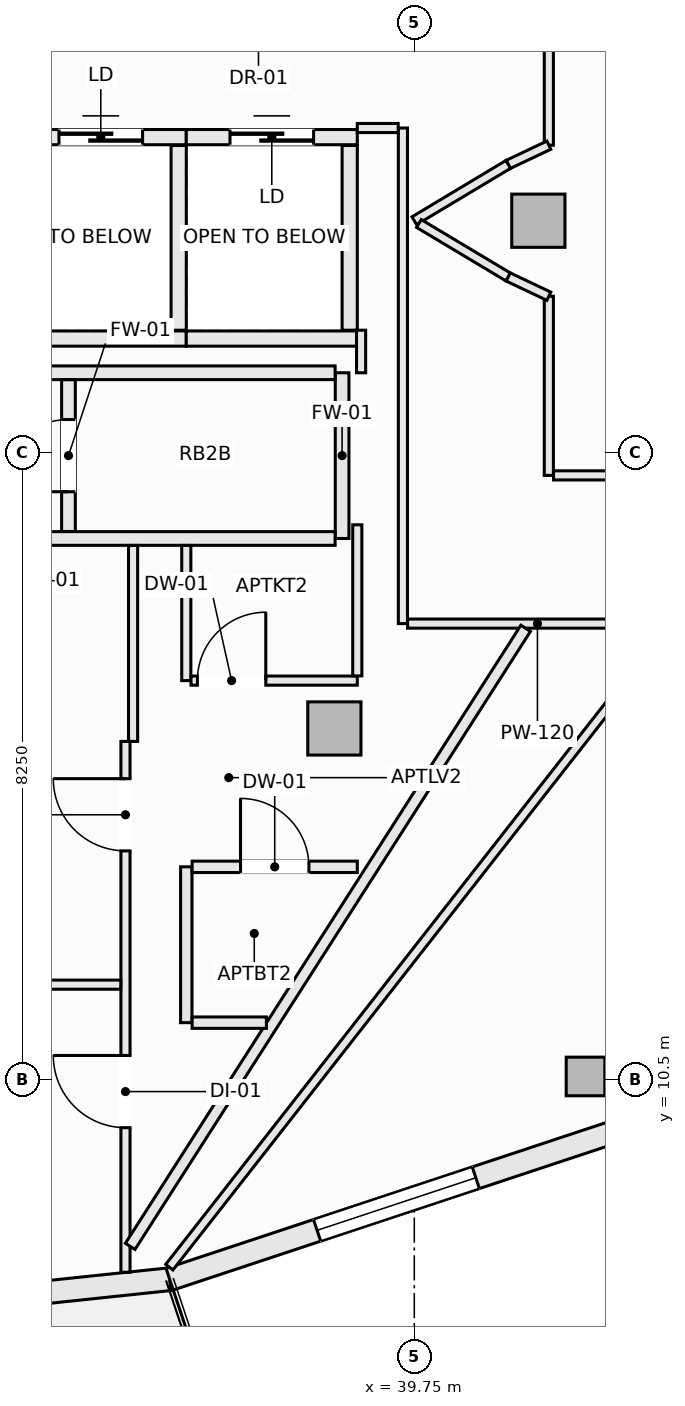
"""IFC4 building model, lengths in metres.
Left out: names, types, materials, properties, quantities, classifications, styles, units other than length and angle.
Written with IfcOpenShell. Run it as: python <this file> out.ifc"""

import sys

from ifc_helpers import new_model, si_unit, direction, frame, frame_2d, origin, origin_2d, place, context, subcontext, project, spatial, rectangle, hollow_rectangle, extrude, element, fill, save


model = new_model("IFC4")
c1 = context("Model", 3, precision=1e-05, world=origin(), true_north=direction((0.0, 1.0)))
c2 = subcontext(c1, "Body", "Model", "MODEL_VIEW")
j1 = project(units=[si_unit("LENGTHUNIT", "METRE"), si_unit("PLANEANGLEUNIT", "RADIAN")], contexts=[c1])
p1 = place(None, origin())
s1 = spatial("IfcSite", under=j1, at=p1, CompositionType="ELEMENT")
p2 = place(p1, origin())
s2 = spatial("IfcBuilding", under=s1, at=p2, CompositionType="ELEMENT")
p3 = place(p2, frame((0.0, 0.0, 212.9)))
s3 = spatial("IfcBuildingStorey", under=s2, at=p3, CompositionType="ELEMENT", Elevation=212.9)
p4 = place(p3, frame((42.003, 10.542, -0.27), z_axis=(0.0, 0.0, 1.0), x_axis=(1.0, 0.0, 0.0)))
e1 = element("IfcColumn", 1, at=p4, inside=s3, PredefinedType="COLUMN", context=c2, shape_type="SweptSolid", body=[
    extrude(hollow_rectangle(XDim=0.508, YDim=0.508, WallThickness=0.019, at=origin_2d()), origin(), (0.0, 0.0, 1.0), 3.3),
])
for number, where, z_axis, x_axis in (
    (2, (38.698, 15.121, -0.27), (0.0, 0.0, 1.0), (1.0, 0.0, 0.0)),
    (3, (41.382, 21.801, -0.27), (0.0, 0.0, 1.0), (1.0, 0.0, 0.0)),
):
    element("IfcColumn", number, at=place(p3, frame(where, z_axis=z_axis, x_axis=x_axis)), inside=s3, PredefinedType="COLUMN", context=c2, shape_type="SweptSolid", body=[
        extrude(rectangle(XDim=0.7, YDim=0.7, at=origin_2d()), origin(), (0.0, 0.0, 1.0), 3.3),
    ])
p5 = place(p3, frame((30.125, 7.2, 0.0), z_axis=(0.0, 0.0, 1.0), x_axis=(0.994497142298, 0.104763705363, 0.0)))
e4 = element("IfcWall", 4, at=p5, inside=s3, PredefinedType="SOLIDWALL", context=c2, shape_type="SweptSolid", body=[
    extrude(rectangle(XDim=6.441, YDim=0.3, at=frame_2d((3.221, 0.0))), origin(), (0.0, 0.0, 1.0), 2.605),
])
p6 = place(p5, frame((2.45, 0.0, 0.72)))
e5 = element("IfcOpeningElement", 5, at=p6, cuts=e4, PredefinedType="OPENING", context=c2, shape_type="SweptSolid", body=[
    extrude(rectangle(XDim=2.2, YDim=1.65, at=frame_2d((1.1, 0.825))), frame((0.0, 0.16, 0.0), z_axis=(0.0, -1.0, 0.0), x_axis=(1.0, 0.0, 0.0)), (0.0, 0.0, 1.0), 0.32),
])
p7 = place(p3, frame((36.531, 7.875, 0.0), z_axis=(0.0, 0.0, 1.0), x_axis=(0.949240877604, 0.314550085495, 0.0)))
e6 = element("IfcWall", 6, at=p7, inside=s3, PredefinedType="SOLIDWALL", context=c2, shape_type="SweptSolid", body=[
    extrude(rectangle(XDim=6.288, YDim=0.3, at=frame_2d((3.144, 0.0))), origin(), (0.0, 0.0, 1.0), 2.605),
])
p8 = place(p7, frame((2.044, 0.0, 0.72)))
e7 = element("IfcOpeningElement", 7, at=p8, cuts=e6, PredefinedType="OPENING", context=c2, shape_type="SweptSolid", body=[
    extrude(rectangle(XDim=2.2, YDim=1.65, at=frame_2d((1.1, 0.825))), frame((0.0, 0.16, 0.0), z_axis=(0.0, -1.0, 0.0), x_axis=(1.0, 0.0, 0.0)), (0.0, 0.0, 1.0), 0.32),
])
p9 = place(p3, frame((34.5, 22.9, 0.0), z_axis=(0.0, 0.0, 1.0), x_axis=(1.0, 0.0, 0.0)))
e8 = element("IfcWall", 8, at=p9, inside=s3, PredefinedType="SOLIDWALL", context=c2, shape_type="SweptSolid", body=[
    extrude(rectangle(XDim=2.25, YDim=0.2, at=frame_2d((1.125, 0.0))), origin(), (0.0, 0.0, 1.0), 3.03),
])
p10 = place(p9, frame((0.575, 0.0, 0.0)))
e9 = element("IfcOpeningElement", 9, at=p10, cuts=e8, PredefinedType="OPENING", context=c2, shape_type="SweptSolid", body=[
    extrude(rectangle(XDim=1.1, YDim=2.2, at=frame_2d((0.55, 1.1))), frame((0.0, 0.11, 0.0), z_axis=(0.0, -1.0, 0.0), x_axis=(1.0, 0.0, 0.0)), (0.0, 0.0, 1.0), 0.22),
])
p11 = place(p3, frame((34.5, 20.25, 0.0), z_axis=(0.0, 0.0, 1.0), x_axis=(1.0, 0.0, 0.0)))
e10 = element("IfcWall", 10, at=p11, inside=s3, PredefinedType="SOLIDWALL", context=c2, shape_type="SweptSolid", body=[
    extrude(rectangle(XDim=2.25, YDim=0.2, at=frame_2d((1.125, 0.0))), origin(), (0.0, 0.0, 1.0), 3.03),
])
p12 = place(p3, frame((36.65, 20.36, 0.0), z_axis=(0.0, 0.0, 1.0), x_axis=(0.0, 1.0, 0.0)))
e11 = element("IfcWall", 11, at=p12, inside=s3, PredefinedType="SOLIDWALL", context=c2, shape_type="SweptSolid", body=[
    extrude(rectangle(XDim=2.43, YDim=0.2, at=frame_2d((1.215, 0.0))), origin(), (0.0, 0.0, 1.0), 3.03),
])
p13 = place(p3, frame((36.75, 22.9, 0.0), z_axis=(0.0, 0.0, 1.0), x_axis=(1.0, 0.0, 0.0)))
e12 = element("IfcWall", 12, at=p13, inside=s3, PredefinedType="SOLIDWALL", context=c2, shape_type="SweptSolid", body=[
    extrude(rectangle(XDim=2.25, YDim=0.2, at=frame_2d((1.125, 0.0))), origin(), (0.0, 0.0, 1.0), 3.03),
])
p14 = place(p13, frame((0.575, 0.0, 0.0)))
e13 = element("IfcOpeningElement", 13, at=p14, cuts=e12, PredefinedType="OPENING", context=c2, shape_type="SweptSolid", body=[
    extrude(rectangle(XDim=1.1, YDim=2.2, at=frame_2d((0.55, 1.1))), frame((0.0, 0.11, 0.0), z_axis=(0.0, -1.0, 0.0), x_axis=(1.0, 0.0, 0.0)), (0.0, 0.0, 1.0), 0.22),
])
p15 = place(p3, frame((36.75, 20.25, 0.0), z_axis=(0.0, 0.0, 1.0), x_axis=(1.0, 0.0, 0.0)))
e14 = element("IfcWall", 14, at=p15, inside=s3, PredefinedType="SOLIDWALL", context=c2, shape_type="SweptSolid", body=[
    extrude(rectangle(XDim=2.25, YDim=0.2, at=frame_2d((1.125, 0.0))), origin(), (0.0, 0.0, 1.0), 3.03),
])
p16 = place(p3, frame((38.9, 20.36, 0.0), z_axis=(0.0, 0.0, 1.0), x_axis=(0.0, 1.0, 0.0)))
e15 = element("IfcWall", 15, at=p16, inside=s3, PredefinedType="SOLIDWALL", context=c2, shape_type="SweptSolid", body=[
    extrude(rectangle(XDim=2.43, YDim=0.2, at=frame_2d((1.215, 0.0))), origin(), (0.0, 0.0, 1.0), 3.03),
])
p17 = place(p3, frame((38.8, 17.62, 0.0), z_axis=(0.0, 0.0, 1.0), x_axis=(0.0, 1.0, 0.0)))
e16 = element("IfcWall", 16, at=p17, inside=s3, PredefinedType="SOLIDWALL", context=c2, shape_type="SweptSolid", body=[
    extrude(rectangle(XDim=2.18, YDim=0.18, at=frame_2d((1.09, 0.0))), origin(), (0.0, 0.0, 1.0), 3.03),
])
p18 = place(p3, frame((30.062, 17.62, 0.0), z_axis=(0.0, 0.0, 1.0), x_axis=(1.0, 0.0, 0.0)))
e17 = element("IfcWall", 17, at=p18, inside=s3, PredefinedType="SOLIDWALL", context=c2, shape_type="SweptSolid", body=[
    extrude(rectangle(XDim=8.646, YDim=0.18, at=frame_2d((4.323, 0.0))), origin(), (0.0, 0.0, 1.0), 3.03),
])
p19 = place(p18, frame((2.299, 0.0, 0.0)))
e18 = element("IfcOpeningElement", 18, at=p19, cuts=e17, PredefinedType="OPENING", context=c2, shape_type="SweptSolid", body=[
    extrude(rectangle(XDim=0.95, YDim=2.1, at=frame_2d((0.475, 1.05))), frame((0.0, 0.1, 0.0), z_axis=(0.0, -1.0, 0.0), x_axis=(1.0, 0.0, 0.0)), (0.0, 0.0, 1.0), 0.2),
])
p20 = place(p3, frame((30.062, 19.8, 0.0), z_axis=(0.0, 0.0, 1.0), x_axis=(1.0, 0.0, 0.0)))
e19 = element("IfcWall", 19, at=p20, inside=s3, PredefinedType="SOLIDWALL", context=c2, shape_type="SweptSolid", body=[
    extrude(rectangle(XDim=8.646, YDim=0.18, at=frame_2d((4.323, 0.0))), origin(), (0.0, 0.0, 1.0), 3.03),
])
p21 = place(p3, frame((35.2, 17.712, 0.0), z_axis=(0.0, 0.0, 1.0), x_axis=(0.0, 1.0, 0.0)))
e20 = element("IfcWall", 20, at=p21, inside=s3, PredefinedType="SOLIDWALL", context=c2, shape_type="SweptSolid", body=[
    extrude(rectangle(XDim=1.996, YDim=0.18, at=frame_2d((0.998, 0.0))), origin(), (0.0, 0.0, 1.0), 3.03),
])
p22 = place(p21, frame((0.523, 0.0, 0.0)))
e21 = element("IfcOpeningElement", 21, at=p22, cuts=e20, PredefinedType="OPENING", context=c2, shape_type="SweptSolid", body=[
    extrude(rectangle(XDim=0.95, YDim=2.1, at=frame_2d((0.475, 1.05))), frame((0.0, 0.1, 0.0), z_axis=(0.0, -1.0, 0.0), x_axis=(1.0, 0.0, 0.0)), (0.0, 0.0, 1.0), 0.2),
])
p23 = place(p3, frame((39.05, 19.8, 0.0), z_axis=(0.0, 0.0, 1.0), x_axis=(0.0, 1.0, 0.0)))
e22 = element("IfcWall", 22, at=p23, inside=s3, PredefinedType="PARTITIONING", context=c2, shape_type="SweptSolid", body=[
    extrude(rectangle(XDim=0.56, YDim=0.12, at=frame_2d((0.28, 0.0))), origin(), (0.0, 0.0, 1.0), 3.03),
])
p24 = place(p3, frame((39.6, 16.5, 0.0), z_axis=(0.0, 0.0, 1.0), x_axis=(0.0, 1.0, 0.0)))
e23 = element("IfcWall", 23, at=p24, inside=s3, PredefinedType="PARTITIONING", context=c2, shape_type="SweptSolid", body=[
    extrude(rectangle(XDim=6.52, YDim=0.12, at=frame_2d((3.26, 0.0))), origin(), (0.0, 0.0, 1.0), 2.478),
])
p25 = place(p3, frame((41.52, 18.45, 0.0), z_axis=(0.0, 0.0, 1.0), x_axis=(0.0, 1.0, 0.0)))
e24 = element("IfcWall", 24, at=p25, inside=s3, PredefinedType="PARTITIONING", context=c2, shape_type="SweptSolid", body=[
    extrude(rectangle(XDim=2.357, YDim=0.12, at=frame_2d((1.178, 0.0))), origin(), (0.0, 0.0, 1.0), 3.03),
])
p26 = place(p3, frame((41.52, 22.794, 0.0), z_axis=(0.0, 0.0, 1.0), x_axis=(0.0, 1.0, 0.0)))
e25 = element("IfcWall", 25, at=p26, inside=s3, PredefinedType="PARTITIONING", context=c2, shape_type="SweptSolid", body=[
    extrude(rectangle(XDim=4.654, YDim=0.12, at=frame_2d((2.327, 0.0))), origin(), (0.0, 0.0, 1.0), 2.478),
])
p27 = place(p26, frame((1.852, 0.0, 0.0)))
e26 = element("IfcOpeningElement", 26, at=p27, cuts=e25, PredefinedType="OPENING", context=c2, shape_type="SweptSolid", body=[
    extrude(rectangle(XDim=0.95, YDim=2.1, at=frame_2d((0.475, 1.05))), frame((0.0, 0.07, 0.0), z_axis=(0.0, -1.0, 0.0), x_axis=(1.0, 0.0, 0.0)), (0.0, 0.0, 1.0), 0.14),
])
p28 = place(p3, frame((40.986, 22.541, 0.0), z_axis=(0.0, 0.0, 1.0), x_axis=(0.903729424576, 0.428104107847, 0.0)))
e27 = element("IfcWall", 27, at=p28, inside=s3, PredefinedType="PARTITIONING", context=c2, shape_type="SweptSolid", body=[
    extrude(rectangle(XDim=0.591, YDim=0.12, at=frame_2d((0.295, 0.0))), origin(), (0.0, 0.0, 1.0), 3.03),
])
p29 = place(p3, frame((39.75, 21.8, 0.0), z_axis=(0.0, 0.0, 1.0), x_axis=(0.857702120906, 0.514146935996, 0.0)))
e28 = element("IfcWall", 28, at=p29, inside=s3, PredefinedType="PARTITIONING", context=c2, shape_type="SweptSolid", body=[
    extrude(rectangle(XDim=1.441, YDim=0.12, at=frame_2d((0.721, 0.0))), origin(), (0.0, 0.0, 1.0), 3.03),
])
p30 = place(p3, frame((39.81, 21.764, 0.0), z_axis=(0.0, 0.0, 1.0), x_axis=(0.858011245414, -0.513630901273, 0.0)))
e29 = element("IfcWall", 29, at=p30, inside=s3, PredefinedType="PARTITIONING", context=c2, shape_type="SweptSolid", body=[
    extrude(rectangle(XDim=1.37, YDim=0.12, at=frame_2d((0.685, 0.0))), origin(), (0.0, 0.0, 1.0), 3.03),
])
p31 = place(p3, frame((40.986, 21.06, 0.0), z_axis=(0.0, 0.0, 1.0), x_axis=(0.90356951601, -0.428441512621, 0.0)))
e30 = element("IfcWall", 30, at=p31, inside=s3, PredefinedType="PARTITIONING", context=c2, shape_type="SweptSolid", body=[
    extrude(rectangle(XDim=0.591, YDim=0.12, at=frame_2d((0.295, 0.0))), origin(), (0.0, 0.0, 1.0), 3.03),
])
p32 = place(p3, frame((41.582, 18.45, 0.0), z_axis=(0.0, 0.0, 1.0), x_axis=(1.0, 0.0, 0.0)))
e31 = element("IfcWall", 31, at=p32, inside=s3, PredefinedType="PARTITIONING", context=c2, shape_type="SweptSolid", body=[
    extrude(rectangle(XDim=3.105, YDim=0.12, at=frame_2d((1.552, 0.0))), origin(), (0.0, 0.0, 1.0), 3.03),
])
p33 = place(p32, frame((1.31, 0.0, 0.0)))
e32 = element("IfcOpeningElement", 32, at=p33, cuts=e31, PredefinedType="OPENING", context=c2, shape_type="SweptSolid", body=[
    extrude(rectangle(XDim=0.95, YDim=2.1, at=frame_2d((0.475, 1.05))), frame((0.0, 0.07, 0.0), z_axis=(0.0, -1.0, 0.0), x_axis=(1.0, 0.0, 0.0)), (0.0, 0.0, 1.0), 0.14),
])
p34 = place(p3, frame((36.527, 8.034, 0.0), z_axis=(0.0, 0.0, 1.0), x_axis=(0.616547497682, 0.787317714206, 0.0)))
e33 = element("IfcWall", 33, at=p34, inside=s3, PredefinedType="PARTITIONING", context=c2, shape_type="SweptSolid", body=[
    extrude(rectangle(XDim=13.151, YDim=0.12, at=frame_2d((6.576, 0.0))), origin(), (0.0, 0.0, 1.0), 3.03),
])
p35 = place(p34, frame((11.24, 0.0, 0.0)))
e34 = element("IfcOpeningElement", 34, at=p35, cuts=e33, PredefinedType="OPENING", context=c2, shape_type="SweptSolid", body=[
    extrude(rectangle(XDim=0.95, YDim=2.1, at=frame_2d((0.475, 1.05))), frame((0.0, 0.07, 0.0), z_axis=(0.0, -1.0, 0.0), x_axis=(1.0, 0.0, 0.0)), (0.0, 0.0, 1.0), 0.14),
])
p36 = place(p3, frame((39.662, 16.5, 0.0), z_axis=(0.0, 0.0, 1.0), x_axis=(1.0, 0.0, 0.0)))
e35 = element("IfcWall", 35, at=p36, inside=s3, PredefinedType="PARTITIONING", context=c2, shape_type="SweptSolid", body=[
    extrude(rectangle(XDim=3.416, YDim=0.12, at=frame_2d((1.708, 0.0))), origin(), (0.0, 0.0, 1.0), 2.77),
])
p37 = place(p3, frame((39.0, 23.02, 0.0), z_axis=(0.0, 0.0, 1.0), x_axis=(1.0, 0.0, 0.0)))
e36 = element("IfcWall", 36, at=p37, inside=s3, PredefinedType="PARTITIONING", context=c2, shape_type="SweptSolid", body=[
    extrude(rectangle(XDim=0.538, YDim=0.12, at=frame_2d((0.269, 0.0))), origin(), (0.0, 0.0, 1.0), 3.03),
])
p38 = place(p3, frame((36.05, 14.95, 0.0), z_axis=(0.0, 0.0, 1.0), x_axis=(0.0, 1.0, 0.0)))
e37 = element("IfcWall", 37, at=p38, inside=s3, PredefinedType="PARTITIONING", context=c2, shape_type="SweptSolid", body=[
    extrude(rectangle(XDim=2.578, YDim=0.12, at=frame_2d((1.289, 0.0))), origin(), (0.0, 0.0, 1.0), 3.03),
])
p39 = place(p3, frame((35.95, 7.966, 0.0), z_axis=(0.0, 0.0, 1.0), x_axis=(0.0, 1.0, 0.0)))
e38 = element("IfcWall", 38, at=p39, inside=s3, PredefinedType="PARTITIONING", context=c2, shape_type="SweptSolid", body=[
    extrude(rectangle(XDim=6.984, YDim=0.12, at=frame_2d((3.492, 0.0))), origin(), (0.0, 0.0, 1.0), 2.77),
])
p40 = place(p39, frame((5.544, 0.0, 0.0)))
e39 = element("IfcOpeningElement", 39, at=p40, cuts=e38, PredefinedType="OPENING", context=c2, shape_type="SweptSolid", body=[
    extrude(rectangle(XDim=0.95, YDim=2.1, at=frame_2d((0.475, 1.05))), frame((0.0, 0.07, 0.0), z_axis=(0.0, -1.0, 0.0), x_axis=(1.0, 0.0, 0.0)), (0.0, 0.0, 1.0), 0.14),
])
p41 = place(p39, frame((1.902, 0.0, 0.0)))
e40 = element("IfcOpeningElement", 40, at=p41, cuts=e38, PredefinedType="OPENING", context=c2, shape_type="SweptSolid", body=[
    extrude(rectangle(XDim=0.95, YDim=2.1, at=frame_2d((0.475, 1.05))), frame((0.0, 0.07, 0.0), z_axis=(0.0, -1.0, 0.0), x_axis=(1.0, 0.0, 0.0)), (0.0, 0.0, 1.0), 0.14),
])
p42 = place(p3, frame((32.034, 11.75, 0.0), z_axis=(0.0, 0.0, 1.0), x_axis=(1.0, 0.0, 0.0)))
e41 = element("IfcWall", 41, at=p42, inside=s3, PredefinedType="PARTITIONING", context=c2, shape_type="SweptSolid", body=[
    extrude(rectangle(XDim=3.854, YDim=0.12, at=frame_2d((1.927, 0.0))), origin(), (0.0, 0.0, 1.0), 3.03),
])
p43 = place(p3, frame((36.75, 11.25, 0.0), z_axis=(0.0, 0.0, 1.0), x_axis=(0.0, 1.0, 0.0)))
e42 = element("IfcWall", 42, at=p43, inside=s3, PredefinedType="PARTITIONING", context=c2, shape_type="SweptSolid", body=[
    extrude(rectangle(XDim=2.05, YDim=0.15, at=frame_2d((1.025, 0.0))), origin(), (0.0, 0.0, 1.0), 3.03),
])
p44 = place(p3, frame((36.75, 15.75, 0.0), z_axis=(0.0, 0.0, 1.0), x_axis=(0.0, 1.0, 0.0)))
e43 = element("IfcWall", 43, at=p44, inside=s3, PredefinedType="PARTITIONING", context=c2, shape_type="SweptSolid", body=[
    extrude(rectangle(XDim=1.778, YDim=0.12, at=frame_2d((0.889, 0.0))), origin(), (0.0, 0.0, 1.0), 3.03),
])
p45 = place(p3, frame((36.812, 15.75, 0.0), z_axis=(0.0, 0.0, 1.0), x_axis=(1.0, 0.0, 0.0)))
e44 = element("IfcWall", 44, at=p45, inside=s3, PredefinedType="PARTITIONING", context=c2, shape_type="SweptSolid", body=[
    extrude(rectangle(XDim=2.188, YDim=0.12, at=frame_2d((1.094, 0.0))), origin(), (0.0, 0.0, 1.0), 3.03),
])
p46 = place(p45, frame((0.084, 0.0, 0.0)))
e45 = element("IfcOpeningElement", 45, at=p46, cuts=e44, PredefinedType="OPENING", context=c2, shape_type="SweptSolid", body=[
    extrude(rectangle(XDim=0.9, YDim=2.1, at=frame_2d((0.45, 1.05))), frame((0.0, 0.07, 0.0), z_axis=(0.0, -1.0, 0.0), x_axis=(1.0, 0.0, 0.0)), (0.0, 0.0, 1.0), 0.14),
])
p47 = place(p3, frame((39.0, 15.812, 0.0), z_axis=(0.0, 0.0, 1.0), x_axis=(0.0, 1.0, 0.0)))
e46 = element("IfcWall", 46, at=p47, inside=s3, PredefinedType="PARTITIONING", context=c2, shape_type="SweptSolid", body=[
    extrude(rectangle(XDim=1.988, YDim=0.12, at=frame_2d((0.994, 0.0))), origin(), (0.0, 0.0, 1.0), 2.478),
])
p48 = place(p3, frame((36.012, 8.307, 0.0), z_axis=(0.0, 0.0, 1.0), x_axis=(0.539002742545, 0.842304008971, 0.0)))
e47 = element("IfcWall", 47, at=p48, inside=s3, PredefinedType="PARTITIONING", context=c2, shape_type="SweptSolid", body=[
    extrude(rectangle(XDim=9.654, YDim=0.15, at=frame_2d((4.827, 0.0))), origin(), (0.0, 0.0, 1.0), 3.03),
])
p49 = place(p3, frame((36.827, 13.3, 0.0), z_axis=(0.0, 0.0, 1.0), x_axis=(1.0, 0.0, 0.0)))
e48 = element("IfcWall", 48, at=p49, inside=s3, PredefinedType="PARTITIONING", context=c2, shape_type="SweptSolid", body=[
    extrude(rectangle(XDim=2.173, YDim=0.15, at=frame_2d((1.086, 0.0))), origin(), (0.0, 0.0, 1.0), 3.03),
])
p50 = place(p49, frame((0.636, 0.0, 0.0)))
e49 = element("IfcOpeningElement", 49, at=p50, cuts=e48, PredefinedType="OPENING", context=c2, shape_type="SweptSolid", body=[
    extrude(rectangle(XDim=0.9, YDim=2.1, at=frame_2d((0.45, 1.05))), frame((0.0, 0.085, 0.0), z_axis=(0.0, -1.0, 0.0), x_axis=(1.0, 0.0, 0.0)), (0.0, 0.0, 1.0), 0.17),
])
p51 = place(p3, frame((36.827, 11.25, 0.0), z_axis=(0.0, 0.0, 1.0), x_axis=(1.0, 0.0, 0.0)))
e50 = element("IfcWall", 50, at=p51, inside=s3, PredefinedType="PARTITIONING", context=c2, shape_type="SweptSolid", body=[
    extrude(rectangle(XDim=0.977, YDim=0.15, at=frame_2d((0.489, 0.0))), origin(), (0.0, 0.0, 1.0), 3.03),
])
p52 = place(p8, origin())
e51 = element("IfcWindow", 51, at=p52, inside=s3, PartitioningType="SINGLE_PANEL", PredefinedType="WINDOW", context=c2, shape_type="SweptSolid", body=[
    extrude(rectangle(XDim=2.2, YDim=1.65, at=frame_2d((1.1, 0.825))), frame((0.0, 0.03, 0.0), z_axis=(0.0, -1.0, 0.0), x_axis=(1.0, 0.0, 0.0)), (0.0, 0.0, 1.0), 0.06),
])
fill(e7, e51)
p53 = place(p10, origin())
e52 = element("IfcDoor", 52, at=p53, inside=s3, OperationType="SLIDING_TO_LEFT", PredefinedType="DOOR", context=c2, shape_type="SweptSolid", body=[
    extrude(rectangle(XDim=1.1, YDim=2.2, at=frame_2d((0.55, 1.1))), frame((0.0, 0.025, 0.0), z_axis=(0.0, -1.0, 0.0), x_axis=(1.0, 0.0, 0.0)), (0.0, 0.0, 1.0), 0.05),
])
fill(e9, e52)
p54 = place(p14, origin())
e53 = element("IfcDoor", 53, at=p54, inside=s3, OperationType="SLIDING_TO_LEFT", PredefinedType="DOOR", context=c2, shape_type="SweptSolid", body=[
    extrude(rectangle(XDim=1.1, YDim=2.2, at=frame_2d((0.55, 1.1))), frame((0.0, 0.025, 0.0), z_axis=(0.0, -1.0, 0.0), x_axis=(1.0, 0.0, 0.0)), (0.0, 0.0, 1.0), 0.05),
])
fill(e13, e53)
p55 = place(p40, origin())
e54 = element("IfcDoor", 54, at=p55, inside=s3, OperationType="SINGLE_SWING_RIGHT", PredefinedType="DOOR", context=c2, shape_type="SweptSolid", body=[
    extrude(rectangle(XDim=0.95, YDim=2.1, at=frame_2d((0.475, 1.05))), frame((0.0, 0.025, 0.0), z_axis=(0.0, -1.0, 0.0), x_axis=(1.0, 0.0, 0.0)), (0.0, 0.0, 1.0), 0.05),
])
fill(e39, e54)
p56 = place(p46, origin())
e55 = element("IfcDoor", 55, at=p56, inside=s3, OperationType="SINGLE_SWING_RIGHT", PredefinedType="DOOR", context=c2, shape_type="SweptSolid", body=[
    extrude(rectangle(XDim=0.9, YDim=2.1, at=frame_2d((0.45, 1.05))), frame((0.0, 0.025, 0.0), z_axis=(0.0, -1.0, 0.0), x_axis=(1.0, 0.0, 0.0)), (0.0, 0.0, 1.0), 0.05),
])
fill(e45, e55)
p57 = place(p50, origin())
e56 = element("IfcDoor", 56, at=p57, inside=s3, OperationType="SINGLE_SWING_LEFT", PredefinedType="DOOR", context=c2, shape_type="SweptSolid", body=[
    extrude(rectangle(XDim=0.9, YDim=2.1, at=frame_2d((0.45, 1.05))), frame((0.0, 0.025, 0.0), z_axis=(0.0, -1.0, 0.0), x_axis=(1.0, 0.0, 0.0)), (0.0, 0.0, 1.0), 0.05),
])
fill(e49, e56)
p58 = place(p41, origin())
e57 = element("IfcDoor", 57, at=p58, inside=s3, OperationType="SINGLE_SWING_RIGHT", PredefinedType="DOOR", context=c2, shape_type="SweptSolid", body=[
    extrude(rectangle(XDim=0.95, YDim=2.1, at=frame_2d((0.475, 1.05))), frame((0.0, 0.025, 0.0), z_axis=(0.0, -1.0, 0.0), x_axis=(1.0, 0.0, 0.0)), (0.0, 0.0, 1.0), 0.05),
])
fill(e40, e57)
p59 = place(p22, origin())
e58 = element("IfcDoor", 58, at=p59, inside=s3, OperationType="SINGLE_SWING_LEFT", PredefinedType="DOOR", context=c2, shape_type="SweptSolid", body=[
    extrude(rectangle(XDim=0.95, YDim=2.1, at=frame_2d((0.475, 1.05))), frame((0.0, 0.025, 0.0), z_axis=(0.0, -1.0, 0.0), x_axis=(1.0, 0.0, 0.0)), (0.0, 0.0, 1.0), 0.05),
])
fill(e21, e58)
save(model, sys.argv[1])
